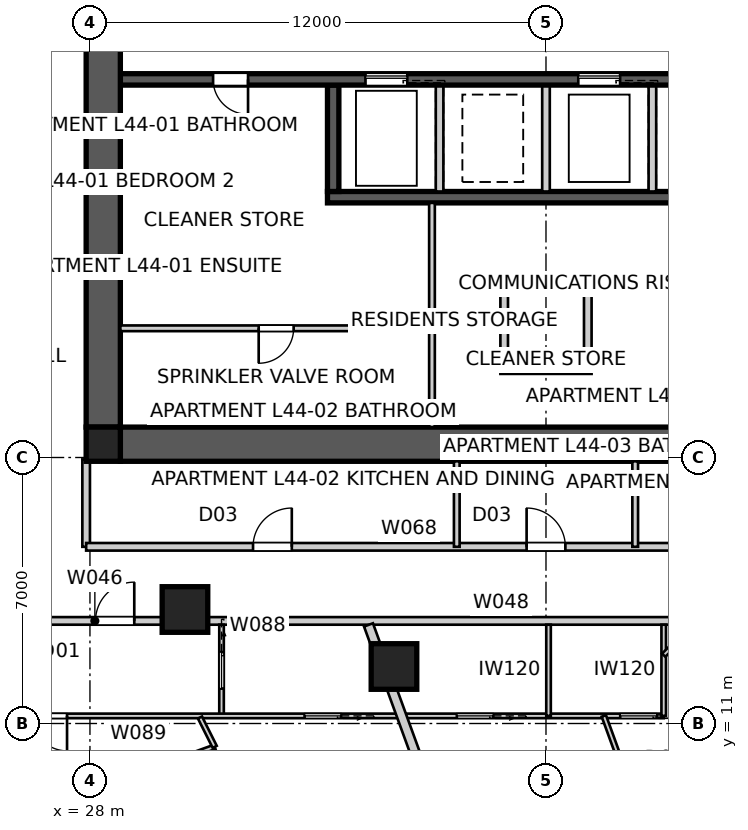
"""IFC4 building model, lengths in metres.
Left out: names, types, materials, properties, quantities, classifications, styles, units other than length and angle.
Written with IfcOpenShell. Run it as: python <this file> out.ifc"""

import sys

from ifc_helpers import new_model, si_unit, direction, frame, frame_2d, origin, origin_2d, place, context, subcontext, project, spatial, polyline, rectangle, outline, extrude, element, fill, save


model = new_model("IFC4")
c1 = context("Model", 3, precision=1e-05, world=origin(), true_north=direction((0.0, 1.0)))
c2 = subcontext(c1, "Body", "Model", "MODEL_VIEW")
j1 = project(units=[si_unit("LENGTHUNIT", "METRE"), si_unit("PLANEANGLEUNIT", "RADIAN")], contexts=[c1])
p1 = place(None, origin())
s1 = spatial("IfcSite", under=j1, at=p1, CompositionType="ELEMENT")
p2 = place(p1, origin())
s2 = spatial("IfcBuilding", under=s1, at=p2, CompositionType="ELEMENT")
p3 = place(p2, frame((0.0, 0.0, 160.8)))
s3 = spatial("IfcBuildingStorey", under=s2, at=p3, CompositionType="ELEMENT", Elevation=160.8)
p4 = place(p3, frame((51.2, 18.35, 0.0), z_axis=(0.0, 0.0, 1.0), x_axis=(-1.0, 0.0, 0.0)))
e1 = element("IfcWall", 1, at=p4, inside=s3, PredefinedType="SHEAR", context=c2, shape_type="SweptSolid", body=[
    extrude(outline(polyline([(0.0, -0.45), (22.4, -0.45), (22.4, -0.025), (22.85, -0.025), (22.85, 0.025), (22.4, 0.025), (22.4, 0.45), (0.0, 0.45), (0.0, 0.025), (-0.45, 0.025), (-0.45, -0.025), (0.0, -0.025), (0.0, -0.45)])), origin(), (0.0, 0.0, 1.0), 3.4),
])
p5 = place(p3, frame((28.35, 41.2, 0.0), z_axis=(0.0, 0.0, 1.0), x_axis=(0.0, -1.0, 0.0)))
e2 = element("IfcWall", 2, at=p5, inside=s3, PredefinedType="SHEAR", context=c2, shape_type="SweptSolid", body=[
    extrude(outline(polyline([(0.0, -0.45), (22.4, -0.45), (22.4, -0.025), (22.85, -0.025), (22.85, 0.025), (22.4, 0.025), (22.4, 0.45), (0.0, 0.45), (0.0, 0.025), (-0.45, 0.025), (-0.45, -0.025), (0.0, -0.025), (0.0, -0.45)])), origin(), (0.0, 0.0, 1.0), 3.4),
])
p6 = place(p5, frame((11.14, 0.0, 0.0)))
e3 = element("IfcOpeningElement", 3, at=p6, cuts=e2, PredefinedType="OPENING", context=c2, shape_type="SweptSolid", body=[
    extrude(rectangle(XDim=1.02, YDim=2.4, at=frame_2d((0.51, 1.2))), frame((0.0, 0.46, 0.0), z_axis=(0.0, -1.0, 0.0), x_axis=(1.0, 0.0, 0.0)), (0.0, 0.0, 1.0), 0.92),
])
p7 = place(p3, frame((51.2, 27.95, 0.0), z_axis=(0.0, 0.0, 1.0), x_axis=(-1.0, 0.0, 0.0)))
e4 = element("IfcWall", 4, at=p7, inside=s3, PredefinedType="SHEAR", context=c2, shape_type="SweptSolid", body=[
    extrude(rectangle(XDim=22.4, YDim=0.3, at=frame_2d((11.2, 0.0))), origin(), (0.0, 0.0, 1.0), 3.4),
])
p8 = place(p7, frame((19.04, 0.0, 0.0)))
e5 = element("IfcOpeningElement", 5, at=p8, cuts=e4, PredefinedType="OPENING", context=c2, shape_type="SweptSolid", body=[
    extrude(rectangle(XDim=0.92, YDim=2.1, at=frame_2d((0.46, 1.05))), frame((0.0, 0.16, 0.0), z_axis=(0.0, -1.0, 0.0), x_axis=(1.0, 0.0, 0.0)), (0.0, 0.0, 1.0), 0.32),
])
p9 = place(p7, frame((1.265, 0.0, 0.0)))
e6 = element("IfcOpeningElement", 6, at=p9, cuts=e4, PredefinedType="OPENING", context=c2, shape_type="SweptSolid", body=[
    extrude(rectangle(XDim=1.02, YDim=2.1, at=frame_2d((0.51, 1.05))), frame((0.0, 0.16, 0.0), z_axis=(0.0, -1.0, 0.0), x_axis=(1.0, 0.0, 0.0)), (0.0, 0.0, 1.0), 0.32),
])
p10 = place(p7, frame((4.015, 0.0, 0.0)))
e7 = element("IfcOpeningElement", 7, at=p10, cuts=e4, PredefinedType="OPENING", context=c2, shape_type="SweptSolid", body=[
    extrude(rectangle(XDim=0.92, YDim=2.1, at=frame_2d((0.46, 1.05))), frame((0.0, 0.16, 0.0), z_axis=(0.0, -1.0, 0.0), x_axis=(1.0, 0.0, 0.0)), (0.0, 0.0, 1.0), 0.32),
])
p11 = place(p7, frame((6.45, 0.0, 0.0)))
e8 = element("IfcOpeningElement", 8, at=p11, cuts=e4, PredefinedType="OPENING", context=c2, shape_type="SweptSolid", body=[
    extrude(rectangle(XDim=1.1, YDim=2.1, at=frame_2d((0.55, 1.05))), frame((0.0, 0.16, 0.0), z_axis=(0.0, -1.0, 0.0), x_axis=(1.0, 0.0, 0.0)), (0.0, 0.0, 1.0), 0.32),
])
p12 = place(p7, frame((9.25, 0.0, 0.0)))
e9 = element("IfcOpeningElement", 9, at=p12, cuts=e4, PredefinedType="OPENING", context=c2, shape_type="SweptSolid", body=[
    extrude(rectangle(XDim=1.1, YDim=2.1, at=frame_2d((0.55, 1.05))), frame((0.0, 0.16, 0.0), z_axis=(0.0, -1.0, 0.0), x_axis=(1.0, 0.0, 0.0)), (0.0, 0.0, 1.0), 0.32),
])
p13 = place(p7, frame((14.85, 0.0, 0.0)))
e10 = element("IfcOpeningElement", 10, at=p13, cuts=e4, PredefinedType="OPENING", context=c2, shape_type="SweptSolid", body=[
    extrude(rectangle(XDim=1.1, YDim=2.1, at=frame_2d((0.55, 1.05))), frame((0.0, 0.16, 0.0), z_axis=(0.0, -1.0, 0.0), x_axis=(1.0, 0.0, 0.0)), (0.0, 0.0, 1.0), 0.32),
])
p14 = place(p3, frame((45.75, 24.85, 0.0), z_axis=(0.0, 0.0, 1.0), x_axis=(-1.0, 0.0, 0.0)))
e11 = element("IfcWall", 11, at=p14, inside=s3, PredefinedType="SHEAR", context=c2, shape_type="SweptSolid", body=[
    extrude(rectangle(XDim=11.5, YDim=0.3, at=frame_2d((5.75, 0.0))), origin(), (0.0, 0.0, 1.0), 3.4),
])
for number, where, z_axis, x_axis in (
    (12, (42.8, 27.8, 0.0), (0.0, 0.0, 1.0), (0.0, -1.0, 0.0)),
    (13, (40.0, 27.8, 0.0), (0.0, 0.0, 1.0), (0.0, -1.0, 0.0)),
    (14, (37.2, 27.8, 0.0), (0.0, 0.0, 1.0), (0.0, -1.0, 0.0)),
):
    element("IfcWall", number, at=place(p3, frame(where, z_axis=z_axis, x_axis=x_axis)), inside=s3, PredefinedType="SOLIDWALL", context=c2, shape_type="SweptSolid", body=[
        extrude(rectangle(XDim=2.8, YDim=0.2, at=frame_2d((1.4, 0.0))), origin(), (0.0, 0.0, 1.0), 3.4),
    ])
p15 = place(p3, frame((34.4, 27.8, 0.0), z_axis=(0.0, 0.0, 1.0), x_axis=(0.0, -1.0, 0.0)))
e15 = element("IfcWall", 15, at=p15, inside=s3, PredefinedType="SHEAR", context=c2, shape_type="SweptSolid", body=[
    extrude(rectangle(XDim=2.8, YDim=0.3, at=frame_2d((1.4, 0.0))), origin(), (0.0, 0.0, 1.0), 3.4),
])
for number, where, z_axis, x_axis in (
    (16, (38.9, 22.4, 0.0), (0.0, 0.0, 1.0), (0.0, -1.0, 0.0)),
    (17, (41.1, 22.4, 0.0), (0.0, 0.0, 1.0), (0.0, -1.0, 0.0)),
):
    element("IfcWall", number, at=place(p3, frame(where, z_axis=z_axis, x_axis=x_axis)), inside=s3, PredefinedType="SOLIDWALL", context=c2, shape_type="SweptSolid", body=[
        extrude(rectangle(XDim=2.0, YDim=0.2, at=frame_2d((1.0, 0.0))), origin(), (0.0, 0.0, 1.0), 3.4),
    ])
for number, where, z_axis, x_axis in (
    (18, (38.8, 22.5, 0.0), (0.0, 0.0, 1.0), (1.0, 0.0, 0.0)),
    (19, (38.8, 20.3, 0.0), (0.0, 0.0, 1.0), (1.0, 0.0, 0.0)),
):
    element("IfcWall", number, at=place(p3, frame(where, z_axis=z_axis, x_axis=x_axis)), inside=s3, PredefinedType="SOLIDWALL", context=c2, shape_type="SweptSolid", body=[
        extrude(rectangle(XDim=2.4, YDim=0.2, at=frame_2d((1.2, 0.0))), origin(), (0.0, 0.0, 1.0), 3.4),
    ])
p16 = place(p3, frame((28.35, 18.35, 0.0), z_axis=(0.0, 0.0, 1.0), x_axis=(1.0, 0.0, 0.0)))
e20 = element("IfcColumn", 20, at=p16, inside=s3, PredefinedType="COLUMN", context=c2, shape_type="SweptSolid", body=[
    extrude(rectangle(XDim=0.9, YDim=0.9, at=origin_2d()), origin(), (0.0, 0.0, 1.0), 3.4),
])
for number, where, z_axis, x_axis in (
    (21, (30.5, 14.0, 0.0), (0.0, 0.0, 1.0), (1.0, 0.0, 0.0)),
    (22, (36.0, 12.5, 0.0), (0.0, 0.0, 1.0), (1.0, 0.0, 0.0)),
):
    element("IfcColumn", number, at=place(p3, frame(where, z_axis=z_axis, x_axis=x_axis)), inside=s3, PredefinedType="COLUMN", context=c2, shape_type="SweptSolid", body=[
        extrude(rectangle(XDim=1.2, YDim=1.2, at=origin_2d()), origin(), (0.0, 0.0, 1.0), 3.4),
    ])
p17 = place(p3, frame((25.5, 13.7, 0.0), z_axis=(0.0, 0.0, 1.0), x_axis=(1.0, 0.0, 0.0)))
e23 = element("IfcWall", 23, at=p17, inside=s3, PredefinedType="PARTITIONING", context=c2, shape_type="SweptSolid", body=[
    extrude(rectangle(XDim=5.258, YDim=0.2, at=frame_2d((2.629, 0.0))), origin(), (0.0, 0.0, 1.0), 3.25),
])
p18 = place(p17, frame((2.646, 0.0, 0.0)))
e24 = element("IfcOpeningElement", 24, at=p18, cuts=e23, PredefinedType="OPENING", context=c2, shape_type="SweptSolid", body=[
    extrude(rectangle(XDim=1.02, YDim=2.34, at=frame_2d((0.51, 1.17))), frame((0.0, 0.11, 0.0), z_axis=(0.0, -1.0, 0.0), x_axis=(1.0, 0.0, 0.0)), (0.0, 0.0, 1.0), 0.22),
])
p19 = place(p3, frame((30.758, 13.7, 0.0), z_axis=(0.0, 0.0, 1.0), x_axis=(1.0, 0.0, 0.0)))
e25 = element("IfcWall", 25, at=p19, inside=s3, PredefinedType="PARTITIONING", context=c2, shape_type="SweptSolid", body=[
    extrude(rectangle(XDim=1.683, YDim=0.2, at=frame_2d((0.842, 0.0))), origin(), (0.0, 0.0, 1.0), 2.55),
])
p20 = place(p3, frame((32.442, 13.7, 0.0), z_axis=(0.0, 0.0, 1.0), x_axis=(1.0, 0.0, 0.0)))
e26 = element("IfcWall", 26, at=p20, inside=s3, PredefinedType="PARTITIONING", context=c2, shape_type="SweptSolid", body=[
    extrude(rectangle(XDim=15.117, YDim=0.2, at=frame_2d((7.558, 0.0))), origin(), (0.0, 0.0, 1.0), 3.25),
])
p21 = place(p20, frame((12.755, 0.0, 0.0)))
e27 = element("IfcOpeningElement", 27, at=p21, cuts=e26, PredefinedType="OPENING", context=c2, shape_type="SweptSolid", body=[
    extrude(rectangle(XDim=1.02, YDim=2.34, at=frame_2d((0.51, 1.17))), frame((0.0, 0.11, 0.0), z_axis=(0.0, -1.0, 0.0), x_axis=(1.0, 0.0, 0.0)), (0.0, 0.0, 1.0), 0.22),
])
p22 = place(p3, frame((38.812, 4.027, 0.0), z_axis=(0.0, 0.0, 1.0), x_axis=(-0.342027987857, 0.939689765573, 0.0)))
e28 = element("IfcWall", 28, at=p22, inside=s3, PredefinedType="PARTITIONING", context=c2, shape_type="SweptSolid", body=[
    extrude(rectangle(XDim=10.182, YDim=0.25, at=frame_2d((5.091, 0.0))), origin(), (0.0, 0.0, 1.0), 3.25),
])
p23 = place(p3, frame((37.0, 18.8, 0.0), z_axis=(0.0, 0.0, 1.0), x_axis=(0.0, 1.0, 0.0)))
e29 = element("IfcWall", 29, at=p23, inside=s3, PredefinedType="SOLIDWALL", context=c2, shape_type="SweptSolid", body=[
    extrude(rectangle(XDim=5.9, YDim=0.15, at=frame_2d((2.95, 0.0))), origin(), (0.0, 0.0, 1.0), 3.25),
])
p24 = place(p3, frame((37.0, 21.4, 0.0), z_axis=(0.0, 0.0, 1.0), x_axis=(-1.0, 0.0, 0.0)))
e30 = element("IfcWall", 30, at=p24, inside=s3, PredefinedType="SOLIDWALL", context=c2, shape_type="SweptSolid", body=[
    extrude(rectangle(XDim=8.2, YDim=0.15, at=frame_2d((4.1, 0.0))), origin(), (0.0, 0.0, 1.0), 3.25),
])
p25 = place(p24, frame((3.64, 0.0, 0.0)))
e31 = element("IfcOpeningElement", 31, at=p25, cuts=e30, PredefinedType="OPENING", context=c2, shape_type="SweptSolid", body=[
    extrude(rectangle(XDim=0.92, YDim=2.1, at=frame_2d((0.46, 1.05))), frame((0.0, 0.085, 0.0), z_axis=(0.0, -1.0, 0.0), x_axis=(1.0, 0.0, 0.0)), (0.0, 0.0, 1.0), 0.17),
])
p26 = place(p3, frame((27.9, 17.95, 0.0), z_axis=(0.0, 0.0, 1.0), x_axis=(0.0, -1.0, 0.0)))
e32 = element("IfcWall", 32, at=p26, inside=s3, PredefinedType="PARTITIONING", context=c2, shape_type="SweptSolid", body=[
    extrude(rectangle(XDim=2.3, YDim=0.2, at=frame_2d((1.15, 0.0))), origin(), (0.0, 0.0, 1.0), 3.25),
])
p27 = place(p3, frame((27.9, 15.65, 0.0), z_axis=(0.0, 0.0, 1.0), x_axis=(1.0, 0.0, 0.0)))
e33 = element("IfcWall", 33, at=p27, inside=s3, PredefinedType="PARTITIONING", context=c2, shape_type="SweptSolid", body=[
    extrude(rectangle(XDim=24.2, YDim=0.2, at=frame_2d((12.1, 0.0))), origin(), (0.0, 0.0, 1.0), 3.25),
])
p28 = place(p27, frame((4.391, 0.0, 0.0)))
e34 = element("IfcOpeningElement", 34, at=p28, cuts=e33, PredefinedType="OPENING", context=c2, shape_type="SweptSolid", body=[
    extrude(rectangle(XDim=1.02, YDim=2.1, at=frame_2d((0.51, 1.05))), frame((0.0, 0.11, 0.0), z_axis=(0.0, -1.0, 0.0), x_axis=(1.0, 0.0, 0.0)), (0.0, 0.0, 1.0), 0.22),
])
p29 = place(p27, frame((18.789, 0.0, 0.0)))
e35 = element("IfcOpeningElement", 35, at=p29, cuts=e33, PredefinedType="OPENING", context=c2, shape_type="SweptSolid", body=[
    extrude(rectangle(XDim=1.02, YDim=2.1, at=frame_2d((0.51, 1.05))), frame((0.0, 0.11, 0.0), z_axis=(0.0, -1.0, 0.0), x_axis=(1.0, 0.0, 0.0)), (0.0, 0.0, 1.0), 0.22),
])
p30 = place(p27, frame((11.59, 0.0, 0.0)))
e36 = element("IfcOpeningElement", 36, at=p30, cuts=e33, PredefinedType="OPENING", context=c2, shape_type="SweptSolid", body=[
    extrude(rectangle(XDim=1.02, YDim=2.1, at=frame_2d((0.51, 1.05))), frame((0.0, 0.11, 0.0), z_axis=(0.0, -1.0, 0.0), x_axis=(1.0, 0.0, 0.0)), (0.0, 0.0, 1.0), 0.22),
])
for number, where, z_axis, x_axis in (
    (37, (37.653, 15.65, 0.0), (0.0, 0.0, 1.0), (0.0, 1.0, 0.0)),
    (38, (42.347, 15.65, 0.0), (0.0, 0.0, 1.0), (0.0, 1.0, 0.0)),
):
    element("IfcWall", number, at=place(p3, frame(where, z_axis=z_axis, x_axis=x_axis)), inside=s3, PredefinedType="SOLIDWALL", context=c2, shape_type="SweptSolid", body=[
        extrude(rectangle(XDim=2.25, YDim=0.15, at=frame_2d((1.125, 0.0))), origin(), (0.0, 0.0, 1.0), 3.25),
    ])
p31 = place(p3, frame((31.462, 13.6, 0.0), z_axis=(0.0, 0.0, 1.0), x_axis=(0.0, -1.0, 0.0)))
e39 = element("IfcWall", 39, at=p31, inside=s3, PredefinedType="PARTITIONING", context=c2, shape_type="SweptSolid", body=[
    extrude(rectangle(XDim=2.4, YDim=0.12, at=frame_2d((1.2, 0.0))), origin(), (0.0, 0.0, 1.0), 3.25),
])
p32 = place(p31, frame((0.72, 0.0, 0.0)))
e40 = element("IfcOpeningElement", 40, at=p32, cuts=e39, PredefinedType="OPENING", context=c2, shape_type="SweptSolid", body=[
    extrude(rectangle(XDim=0.96, YDim=2.1, at=frame_2d((0.48, 1.05))), frame((0.0, 0.07, 0.0), z_axis=(0.0, -1.0, 0.0), x_axis=(1.0, 0.0, 0.0)), (0.0, 0.0, 1.0), 0.14),
])
p33 = place(p3, frame((43.098, 11.2, 0.0), z_axis=(0.0, 0.0, 1.0), x_axis=(-1.0, 0.0, 0.0)))
e41 = element("IfcWall", 41, at=p33, inside=s3, PredefinedType="PARTITIONING", context=c2, shape_type="SweptSolid", body=[
    extrude(rectangle(XDim=20.098, YDim=0.12, at=frame_2d((10.049, 0.0))), origin(), (0.0, 0.0, 1.0), 3.25),
])
p34 = place(p33, frame((15.701, 0.0, 0.0)))
e42 = element("IfcOpeningElement", 42, at=p34, cuts=e41, PredefinedType="OPENING", context=c2, shape_type="SweptSolid", body=[
    extrude(rectangle(XDim=0.92, YDim=2.34, at=frame_2d((0.46, 1.17))), frame((0.0, 0.07, 0.0), z_axis=(0.0, -1.0, 0.0), x_axis=(1.0, 0.0, 0.0)), (0.0, 0.0, 1.0), 0.14),
])
p35 = place(p33, frame((8.49, 0.0, 0.0)))
e43 = element("IfcOpeningElement", 43, at=p35, cuts=e41, PredefinedType="OPENING", context=c2, shape_type="SweptSolid", body=[
    extrude(rectangle(XDim=0.96, YDim=2.1, at=frame_2d((0.48, 1.05))), frame((0.0, 0.07, 0.0), z_axis=(0.0, -1.0, 0.0), x_axis=(1.0, 0.0, 0.0)), (0.0, 0.0, 1.0), 0.14),
])
p36 = place(p33, frame((0.185, 0.0, 0.0)))
e44 = element("IfcOpeningElement", 44, at=p36, cuts=e41, PredefinedType="OPENING", context=c2, shape_type="SweptSolid", body=[
    extrude(rectangle(XDim=0.96, YDim=2.1, at=frame_2d((0.48, 1.05))), frame((0.0, 0.07, 0.0), z_axis=(0.0, -1.0, 0.0), x_axis=(1.0, 0.0, 0.0)), (0.0, 0.0, 1.0), 0.14),
])
p37 = place(p33, frame((4.484, 0.0, 0.0)))
e45 = element("IfcOpeningElement", 45, at=p37, cuts=e41, PredefinedType="OPENING", context=c2, shape_type="SweptSolid", body=[
    extrude(rectangle(XDim=0.96, YDim=2.1, at=frame_2d((0.48, 1.05))), frame((0.0, 0.07, 0.0), z_axis=(0.0, -1.0, 0.0), x_axis=(1.0, 0.0, 0.0)), (0.0, 0.0, 1.0), 0.14),
])
p38 = place(p3, frame((22.769, 7.287, 0.0), z_axis=(0.0, 0.0, 1.0), x_axis=(0.939692673089, 0.342019999623, 0.0)))
e46 = element("IfcWall", 46, at=p38, inside=s3, PredefinedType="PARTITIONING", context=c2, shape_type="SweptSolid", body=[
    extrude(rectangle(XDim=9.06, YDim=0.12, at=frame_2d((4.53, 0.0))), origin(), (0.0, 0.0, 1.0), 3.25),
])
p39 = place(p3, frame((31.283, 10.385, 0.0), z_axis=(0.0, 0.0, 1.0), x_axis=(-0.448117513314, 0.893974660861, 0.0)))
e47 = element("IfcWall", 47, at=p39, inside=s3, PredefinedType="PARTITIONING", context=c2, shape_type="SweptSolid", body=[
    extrude(rectangle(XDim=0.864, YDim=0.12, at=frame_2d((0.432, 0.0))), origin(), (0.0, 0.0, 1.0), 3.25),
])
p40 = place(p3, frame((43.098, 11.2, 0.0), z_axis=(0.0, 0.0, 1.0), x_axis=(0.0, 1.0, 0.0)))
e48 = element("IfcWall", 48, at=p40, inside=s3, PredefinedType="PARTITIONING", context=c2, shape_type="SweptSolid", body=[
    extrude(rectangle(XDim=2.4, YDim=0.12, at=frame_2d((1.2, 0.0))), origin(), (0.0, 0.0, 1.0), 3.25),
])
p41 = place(p3, frame((43.35, 13.05, 0.0), z_axis=(0.0, 0.0, 1.0), x_axis=(-0.707106781187, -0.707106781187, 0.0)))
e49 = element("IfcWall", 49, at=p41, inside=s3, PredefinedType="PARTITIONING", context=c2, shape_type="SweptSolid", body=[
    extrude(rectangle(XDim=0.357, YDim=0.12, at=frame_2d((0.178, 0.0))), origin(), (0.0, 0.0, 1.0), 3.25),
])
p42 = place(p3, frame((40.067, 13.6, 0.0), z_axis=(0.0, 0.0, 1.0), x_axis=(0.0, -1.0, 0.0)))
e50 = element("IfcWall", 50, at=p42, inside=s3, PredefinedType="PARTITIONING", context=c2, shape_type="SweptSolid", body=[
    extrude(rectangle(XDim=2.4, YDim=0.12, at=frame_2d((1.2, 0.0))), origin(), (0.0, 0.0, 1.0), 2.796),
])
p43 = place(p3, frame((41.522, 11.2, 0.0), z_axis=(0.0, 0.0, 1.0), x_axis=(0.342028262279, -0.939689665689, 0.0)))
e51 = element("IfcWall", 51, at=p43, inside=s3, PredefinedType="PARTITIONING", context=c2, shape_type="SweptSolid", body=[
    extrude(rectangle(XDim=5.773, YDim=0.12, at=frame_2d((2.887, 0.0))), origin(), (0.0, 0.0, 1.0), 3.25),
])
p44 = place(p43, frame((2.447, 0.0, 0.0)))
e52 = element("IfcOpeningElement", 52, at=p44, cuts=e51, PredefinedType="OPENING", context=c2, shape_type="SweptSolid", body=[
    extrude(rectangle(XDim=0.92, YDim=2.34, at=frame_2d((0.46, 1.17))), frame((0.0, 0.07, 0.0), z_axis=(0.0, -1.0, 0.0), x_axis=(1.0, 0.0, 0.0)), (0.0, 0.0, 1.0), 0.14),
])
p45 = place(p8, origin())
e53 = element("IfcDoor", 53, at=p45, inside=s3, OperationType="SINGLE_SWING_LEFT", PredefinedType="DOOR", context=c2, shape_type="SweptSolid", body=[
    extrude(rectangle(XDim=0.92, YDim=2.1, at=frame_2d((0.46, 1.05))), frame((0.0, 0.025, 0.0), z_axis=(0.0, -1.0, 0.0), x_axis=(1.0, 0.0, 0.0)), (0.0, 0.0, 1.0), 0.05),
])
fill(e5, e53)
p46 = place(p28, origin())
e54 = element("IfcDoor", 54, at=p46, inside=s3, OperationType="SINGLE_SWING_RIGHT", PredefinedType="DOOR", context=c2, shape_type="SweptSolid", body=[
    extrude(rectangle(XDim=1.02, YDim=2.1, at=frame_2d((0.51, 1.05))), frame((0.0, 0.025, 0.0), z_axis=(0.0, -1.0, 0.0), x_axis=(1.0, 0.0, 0.0)), (0.0, 0.0, 1.0), 0.05),
])
fill(e34, e54)
p47 = place(p18, origin())
e55 = element("IfcDoor", 55, at=p47, inside=s3, OperationType="SINGLE_SWING_RIGHT", PredefinedType="DOOR", context=c2, shape_type="SweptSolid", body=[
    extrude(rectangle(XDim=1.02, YDim=2.34, at=frame_2d((0.51, 1.17))), frame((0.0, 0.025, 0.0), z_axis=(0.0, -1.0, 0.0), x_axis=(1.0, 0.0, 0.0)), (0.0, 0.0, 1.0), 0.05),
])
fill(e24, e55)
p48 = place(p30, origin())
e56 = element("IfcDoor", 56, at=p48, inside=s3, OperationType="SINGLE_SWING_LEFT", PredefinedType="DOOR", context=c2, shape_type="SweptSolid", body=[
    extrude(rectangle(XDim=1.02, YDim=2.1, at=frame_2d((0.51, 1.05))), frame((0.0, 0.025, 0.0), z_axis=(0.0, -1.0, 0.0), x_axis=(1.0, 0.0, 0.0)), (0.0, 0.0, 1.0), 0.05),
])
fill(e36, e56)
p49 = place(p25, origin())
e57 = element("IfcDoor", 57, at=p49, inside=s3, OperationType="SINGLE_SWING_RIGHT", PredefinedType="DOOR", context=c2, shape_type="SweptSolid", body=[
    extrude(rectangle(XDim=0.92, YDim=2.1, at=frame_2d((0.46, 1.05))), frame((0.0, 0.025, 0.0), z_axis=(0.0, -1.0, 0.0), x_axis=(1.0, 0.0, 0.0)), (0.0, 0.0, 1.0), 0.05),
])
fill(e31, e57)
p50 = place(p34, origin())
e58 = element("IfcDoor", 58, at=p50, inside=s3, OperationType="SINGLE_SWING_LEFT", PredefinedType="DOOR", context=c2, shape_type="SweptSolid", body=[
    extrude(rectangle(XDim=0.92, YDim=2.34, at=frame_2d((0.46, 1.17))), frame((0.0, 0.025, 0.0), z_axis=(0.0, -1.0, 0.0), x_axis=(1.0, 0.0, 0.0)), (0.0, 0.0, 1.0), 0.05),
])
fill(e42, e58)
p51 = place(p32, origin())
e59 = element("IfcDoor", 59, at=p51, inside=s3, OperationType="SLIDING_TO_LEFT", PredefinedType="DOOR", context=c2, shape_type="SweptSolid", body=[
    extrude(rectangle(XDim=0.96, YDim=2.1, at=frame_2d((0.48, 1.05))), frame((0.0, 0.025, 0.0), z_axis=(0.0, -1.0, 0.0), x_axis=(1.0, 0.0, 0.0)), (0.0, 0.0, 1.0), 0.05),
])
fill(e40, e59)
p52 = place(p35, origin())
e60 = element("IfcDoor", 60, at=p52, inside=s3, OperationType="SLIDING_TO_LEFT", PredefinedType="DOOR", context=c2, shape_type="SweptSolid", body=[
    extrude(rectangle(XDim=0.96, YDim=2.1, at=frame_2d((0.48, 1.05))), frame((0.0, 0.025, 0.0), z_axis=(0.0, -1.0, 0.0), x_axis=(1.0, 0.0, 0.0)), (0.0, 0.0, 1.0), 0.05),
])
fill(e43, e60)
p53 = place(p36, origin())
e61 = element("IfcDoor", 61, at=p53, inside=s3, OperationType="SLIDING_TO_LEFT", PredefinedType="DOOR", context=c2, shape_type="SweptSolid", body=[
    extrude(rectangle(XDim=0.96, YDim=2.1, at=frame_2d((0.48, 1.05))), frame((0.0, 0.025, 0.0), z_axis=(0.0, -1.0, 0.0), x_axis=(1.0, 0.0, 0.0)), (0.0, 0.0, 1.0), 0.05),
])
fill(e44, e61)
p54 = place(p37, origin())
e62 = element("IfcDoor", 62, at=p54, inside=s3, OperationType="SLIDING_TO_LEFT", PredefinedType="DOOR", context=c2, shape_type="SweptSolid", body=[
    extrude(rectangle(XDim=0.96, YDim=2.1, at=frame_2d((0.48, 1.05))), frame((0.0, 0.025, 0.0), z_axis=(0.0, -1.0, 0.0), x_axis=(1.0, 0.0, 0.0)), (0.0, 0.0, 1.0), 0.05),
])
fill(e45, e62)
p55 = place(p12, origin())
e63 = element("IfcDoor", 63, at=p55, inside=s3, OperationType="SLIDING_TO_LEFT", PredefinedType="DOOR", context=c2, shape_type="SweptSolid", body=[
    extrude(rectangle(XDim=1.1, YDim=2.1, at=frame_2d((0.55, 1.05))), frame((0.0, 0.025, 0.0), z_axis=(0.0, -1.0, 0.0), x_axis=(1.0, 0.0, 0.0)), (0.0, 0.0, 1.0), 0.05),
])
fill(e9, e63)
p56 = place(p13, origin())
e64 = element("IfcDoor", 64, at=p56, inside=s3, OperationType="SLIDING_TO_LEFT", PredefinedType="DOOR", context=c2, shape_type="SweptSolid", body=[
    extrude(rectangle(XDim=1.1, YDim=2.1, at=frame_2d((0.55, 1.05))), frame((0.0, 0.025, 0.0), z_axis=(0.0, -1.0, 0.0), x_axis=(1.0, 0.0, 0.0)), (0.0, 0.0, 1.0), 0.05),
])
fill(e10, e64)
save(model, sys.argv[1])
